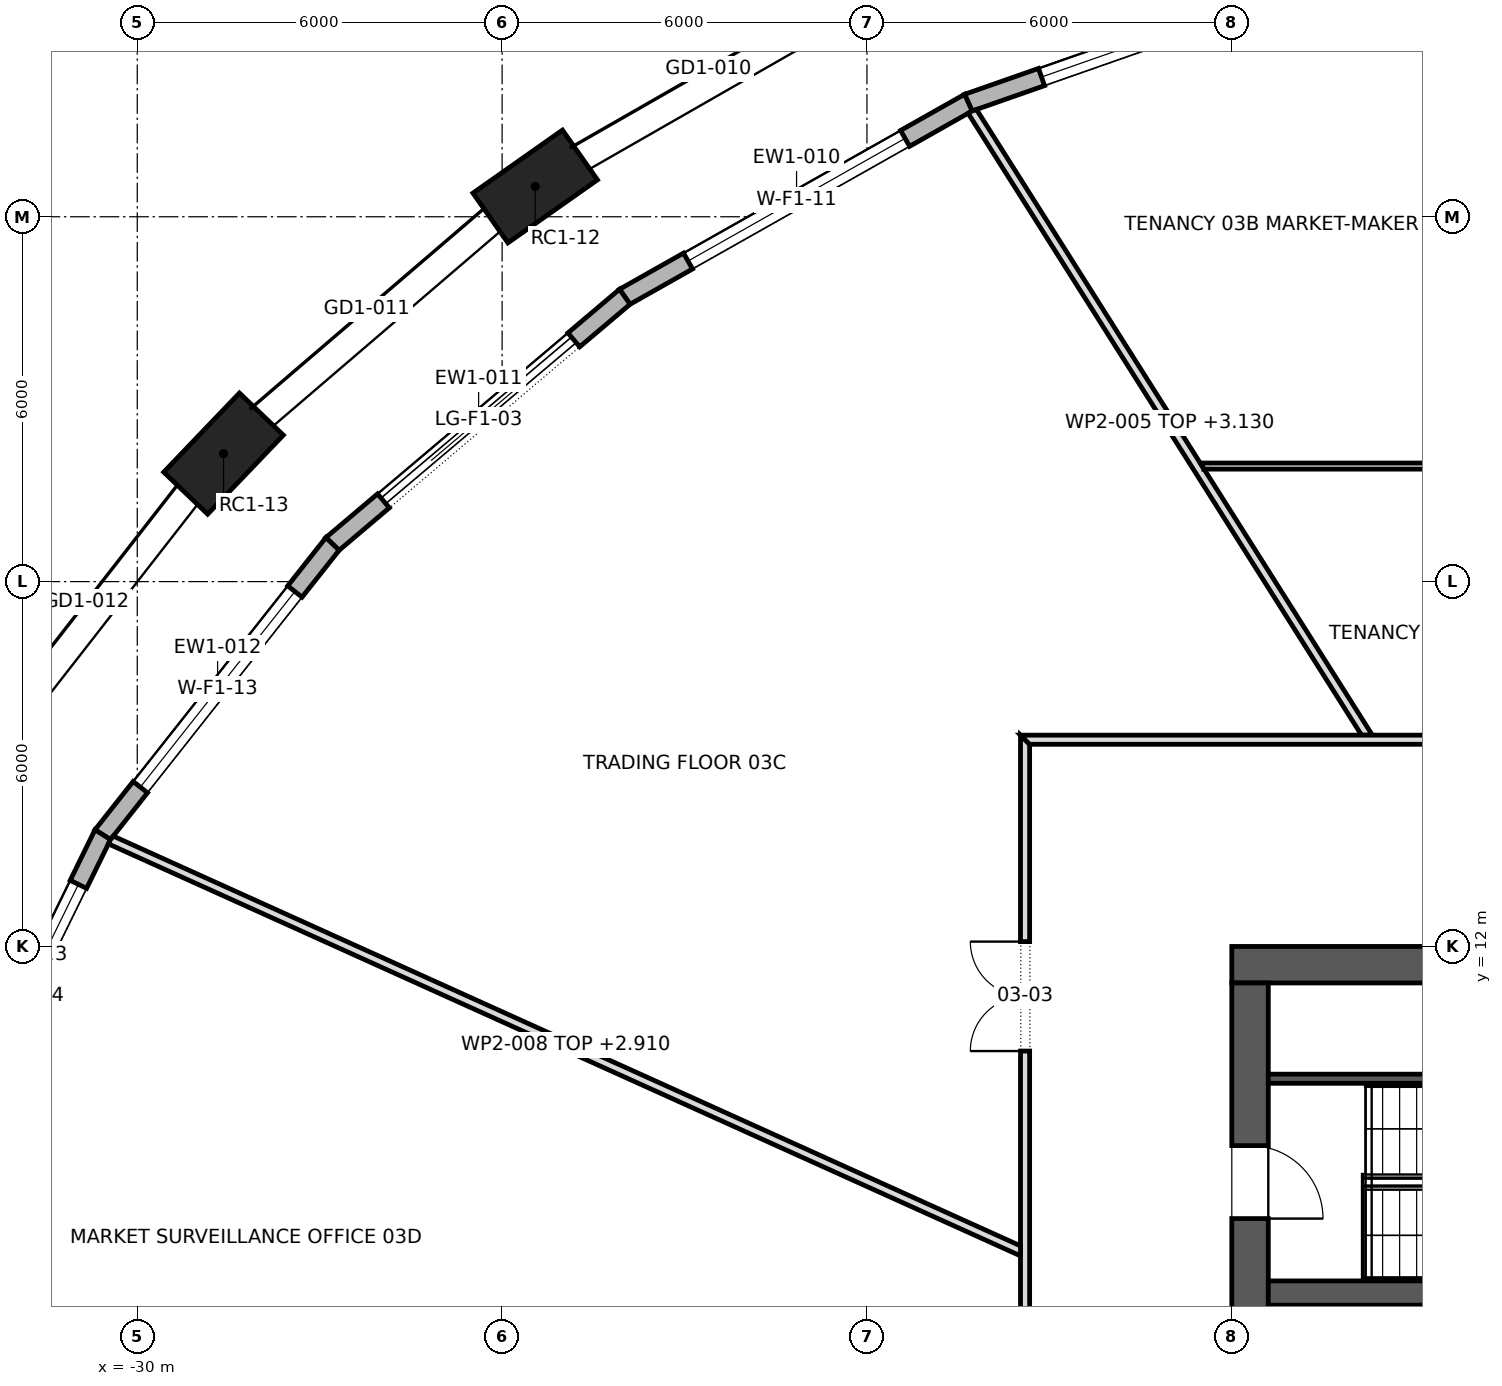
"""IFC4 building model, lengths in metres.
Left out: names, types, materials, properties, quantities, classifications, styles, units other than length and angle.
Written with IfcOpenShell. Run it as: python <this file> out.ifc"""

import sys

from ifc_helpers import new_model, si_unit, direction, frame, frame_2d, origin, origin_2d, place, context, subcontext, project, spatial, polyline, rectangle, outline, extrude, element, fill, save


model = new_model("IFC4")
c1 = context("Model", 3, precision=1e-05, world=origin(), true_north=direction((0.0, 1.0)))
c2 = subcontext(c1, "Body", "Model", "MODEL_VIEW")
j1 = project(units=[si_unit("LENGTHUNIT", "METRE"), si_unit("PLANEANGLEUNIT", "RADIAN")], contexts=[c1])
p1 = place(None, origin())
s1 = spatial("IfcSite", under=j1, at=p1, CompositionType="ELEMENT")
p2 = place(p1, origin())
s2 = spatial("IfcBuilding", under=s1, at=p2, CompositionType="ELEMENT")
p3 = place(p2, frame((0.0, 0.0, 57.1)))
s3 = spatial("IfcBuildingStorey", under=s2, at=p3, CompositionType="ELEMENT", Elevation=57.1)
for number, where, z_axis, x_axis in (
    (1, (-23.456, 24.498, 0.0), (0.0, 0.0, 1.0), (-0.818, -0.575, 0.0)),
    (2, (-28.581, 20.105, 0.0), (0.0, 0.0, 1.0), (-0.692, -0.722, 0.0)),
):
    element("IfcColumn", number, at=place(p3, frame(where, z_axis=z_axis, x_axis=x_axis)), inside=s3, PredefinedType="COLUMN", context=c2, shape_type="SweptSolid", body=[
        extrude(rectangle(XDim=1.8, YDim=1.0, at=origin_2d()), origin(), (0.0, 0.0, 1.0), 4.2),
    ])
p4 = place(p3, frame((-12.0, 11.7, 0.0), z_axis=(0.0, 0.0, 1.0), x_axis=(1.0, 0.0, 0.0)))
e3 = element("IfcWall", 3, at=p4, inside=s3, PredefinedType="SHEAR", context=c2, shape_type="SweptSolid", body=[
    extrude(rectangle(XDim=24.0, YDim=0.6, at=frame_2d((12.0, 0.0))), origin(), (0.0, 0.0, 1.0), 4.2),
])
p5 = place(p4, frame((9.975, 0.0, 0.0)))
e4 = element("IfcOpeningElement", 4, at=p5, cuts=e3, PredefinedType="OPENING", context=c2, shape_type="SweptSolid", body=[
    extrude(rectangle(XDim=0.9, YDim=2.1, at=frame_2d((0.45, 1.05))), frame((0.0, 0.312, 0.0), z_axis=(0.0, -1.0, 0.0), x_axis=(1.0, 0.0, 0.0)), (0.0, 0.0, 1.0), 0.624),
])
p6 = place(p4, frame((3.6, 0.0, 0.0)))
e5 = element("IfcOpeningElement", 5, at=p6, cuts=e3, PredefinedType="OPENING", context=c2, shape_type="SweptSolid", body=[
    extrude(rectangle(XDim=0.8, YDim=2.1, at=frame_2d((0.4, 1.05))), frame((0.0, 0.312, 0.0), z_axis=(0.0, -1.0, 0.0), x_axis=(1.0, 0.0, 0.0)), (0.0, 0.0, 1.0), 0.624),
])
p7 = place(p4, frame((6.2, 0.0, 0.0)))
e6 = element("IfcOpeningElement", 6, at=p7, cuts=e3, PredefinedType="OPENING", context=c2, shape_type="SweptSolid", body=[
    extrude(rectangle(XDim=0.8, YDim=2.1, at=frame_2d((0.4, 1.05))), frame((0.0, 0.312, 0.0), z_axis=(0.0, -1.0, 0.0), x_axis=(1.0, 0.0, 0.0)), (0.0, 0.0, 1.0), 0.624),
])
p8 = place(p4, frame((15.85, 0.0, 0.0)))
e7 = element("IfcOpeningElement", 7, at=p8, cuts=e3, PredefinedType="OPENING", context=c2, shape_type="SweptSolid", body=[
    extrude(rectangle(XDim=0.8, YDim=2.1, at=frame_2d((0.4, 1.05))), frame((0.0, 0.312, 0.0), z_axis=(0.0, -1.0, 0.0), x_axis=(1.0, 0.0, 0.0)), (0.0, 0.0, 1.0), 0.624),
])
p9 = place(p3, frame((-11.7, -11.4, 0.0), z_axis=(0.0, 0.0, 1.0), x_axis=(0.0, 1.0, 0.0)))
e8 = element("IfcWall", 8, at=p9, inside=s3, PredefinedType="SHEAR", context=c2, shape_type="SweptSolid", body=[
    extrude(rectangle(XDim=22.8, YDim=0.6, at=frame_2d((11.4, 0.0))), origin(), (0.0, 0.0, 1.0), 4.2),
])
p10 = place(p9, frame((10.2, 0.0, 0.0)))
e9 = element("IfcOpeningElement", 9, at=p10, cuts=e8, PredefinedType="OPENING", context=c2, shape_type="SweptSolid", body=[
    extrude(rectangle(XDim=2.4, YDim=2.1, at=frame_2d((1.2, 1.05))), frame((0.0, 0.312, 0.0), z_axis=(0.0, -1.0, 0.0), x_axis=(1.0, 0.0, 0.0)), (0.0, 0.0, 1.0), 0.624),
])
p11 = place(p9, frame((18.925, 0.0, 0.0)))
e10 = element("IfcOpeningElement", 10, at=p11, cuts=e8, PredefinedType="OPENING", context=c2, shape_type="SweptSolid", body=[
    extrude(rectangle(XDim=1.2, YDim=2.1, at=frame_2d((0.6, 1.05))), frame((0.0, 0.312, 0.0), z_axis=(0.0, -1.0, 0.0), x_axis=(1.0, 0.0, 0.0)), (0.0, 0.0, 1.0), 0.624),
])
p12 = place(p9, frame((2.675, 0.0, 0.0)))
e11 = element("IfcOpeningElement", 11, at=p12, cuts=e8, PredefinedType="OPENING", context=c2, shape_type="SweptSolid", body=[
    extrude(rectangle(XDim=1.2, YDim=2.1, at=frame_2d((0.6, 1.05))), frame((0.0, 0.312, 0.0), z_axis=(0.0, -1.0, 0.0), x_axis=(1.0, 0.0, 0.0)), (0.0, 0.0, 1.0), 0.624),
])
p13 = place(p3, frame((-11.4, 6.3, 0.0), z_axis=(0.0, 0.0, 1.0), x_axis=(1.0, 0.0, 0.0)))
e12 = element("IfcWall", 12, at=p13, inside=s3, PredefinedType="SHEAR", context=c2, shape_type="SweptSolid", body=[
    extrude(rectangle(XDim=22.8, YDim=0.4, at=frame_2d((11.4, 0.0))), origin(), (0.0, 0.0, 1.0), 4.2),
])
p14 = place(p13, frame((20.85, 0.0, 0.0)))
e13 = element("IfcOpeningElement", 13, at=p14, cuts=e12, PredefinedType="OPENING", context=c2, shape_type="SweptSolid", body=[
    extrude(rectangle(XDim=1.1, YDim=2.1, at=frame_2d((0.55, 1.05))), frame((0.0, 0.212, 0.0), z_axis=(0.0, -1.0, 0.0), x_axis=(1.0, 0.0, 0.0)), (0.0, 0.0, 1.0), 0.424),
])
p15 = place(p3, frame((-8.75, 3.2, 0.0), z_axis=(0.0, 0.0, 1.0), x_axis=(0.0, 1.0, 0.0)))
e14 = element("IfcWall", 14, at=p15, inside=s3, PredefinedType="SHEAR", context=c2, shape_type="SweptSolid", body=[
    extrude(rectangle(XDim=2.9, YDim=0.3, at=frame_2d((1.45, 0.0))), origin(), (0.0, 0.0, 1.0), 4.2),
])
p16 = place(p3, frame((-10.057, 28.074, 0.0), z_axis=(0.0, 0.0, 1.0), x_axis=(-0.943790794479, -0.330543395421, 0.0)))
e15 = element("IfcWall", 15, at=p16, inside=s3, PredefinedType="STANDARD", context=c2, shape_type="SweptSolid", body=[
    extrude(outline(polyline([(-0.013, -0.15), (6.663, -0.15), (6.636, 0.15), (0.013, 0.15), (-0.013, -0.15)])), origin(), (0.0, 0.0, 1.0), 3.9),
])
p17 = place(p16, frame((1.275, 0.0, 0.6)))
e16 = element("IfcOpeningElement", 16, at=p17, cuts=e15, PredefinedType="OPENING", context=c2, shape_type="SweptSolid", body=[
    extrude(rectangle(XDim=4.1, YDim=2.85, at=frame_2d((2.05, 1.425))), frame((0.0, 0.162, 0.0), z_axis=(0.0, -1.0, 0.0), x_axis=(1.0, 0.0, 0.0)), (0.0, 0.0, 1.0), 0.324),
])
p18 = place(p3, frame((-16.333, 25.876, 0.0), z_axis=(0.0, 0.0, 1.0), x_axis=(-0.870647609977, -0.491907246584, 0.0)))
e17 = element("IfcWall", 17, at=p18, inside=s3, PredefinedType="STANDARD", context=c2, shape_type="SweptSolid", body=[
    extrude(outline(polyline([(-0.013, -0.15), (6.503, -0.15), (6.475, 0.15), (0.013, 0.15), (-0.013, -0.15)])), origin(), (0.0, 0.0, 1.0), 3.9),
])
p19 = place(p18, frame((1.195, 0.0, 0.6)))
e18 = element("IfcOpeningElement", 18, at=p19, cuts=e17, PredefinedType="OPENING", context=c2, shape_type="SweptSolid", body=[
    extrude(rectangle(XDim=4.1, YDim=2.85, at=frame_2d((2.05, 1.425))), frame((0.0, 0.162, 0.0), z_axis=(0.0, -1.0, 0.0), x_axis=(1.0, 0.0, 0.0)), (0.0, 0.0, 1.0), 0.324),
])
p20 = place(p3, frame((-21.983, 22.684, 0.0), z_axis=(0.0, 0.0, 1.0), x_axis=(-0.763614259808, -0.645672720671, 0.0)))
e19 = element("IfcWall", 19, at=p20, inside=s3, PredefinedType="STANDARD", context=c2, shape_type="SweptSolid", body=[
    extrude(outline(polyline([(-0.014, -0.15), (6.31, -0.15), (6.28, 0.15), (0.014, 0.15), (-0.014, -0.15)])), origin(), (0.0, 0.0, 1.0), 3.9),
])
p21 = place(p20, frame((1.097, 0.0, 0.0)))
e20 = element("IfcOpeningElement", 20, at=p21, cuts=e19, PredefinedType="OPENING", context=c2, shape_type="SweptSolid", body=[
    extrude(rectangle(XDim=4.1, YDim=3.45, at=frame_2d((2.05, 1.725))), frame((0.0, 0.162, 0.0), z_axis=(0.0, -1.0, 0.0), x_axis=(1.0, 0.0, 0.0)), (0.0, 0.0, 1.0), 0.324),
])
p22 = place(p3, frame((-26.79, 18.62, 0.0), z_axis=(0.0, 0.0, 1.0), x_axis=(-0.619993638342, -0.78460683684, 0.0)))
e21 = element("IfcWall", 21, at=p22, inside=s3, PredefinedType="STANDARD", context=c2, shape_type="SweptSolid", body=[
    extrude(outline(polyline([(-0.015, -0.15), (6.11, -0.15), (6.078, 0.15), (0.015, 0.15), (-0.015, -0.15)])), origin(), (0.0, 0.0, 1.0), 3.9),
])
p23 = place(p22, frame((0.997, 0.0, 0.6)))
e22 = element("IfcOpeningElement", 22, at=p23, cuts=e21, PredefinedType="OPENING", context=c2, shape_type="SweptSolid", body=[
    extrude(rectangle(XDim=4.1, YDim=2.85, at=frame_2d((2.05, 1.425))), frame((0.0, 0.162, 0.0), z_axis=(0.0, -1.0, 0.0), x_axis=(1.0, 0.0, 0.0)), (0.0, 0.0, 1.0), 0.324),
])
p24 = place(p3, frame((-30.568, 13.838, 0.0), z_axis=(0.0, 0.0, 1.0), x_axis=(-0.439906146647, -0.898043752911, 0.0)))
e23 = element("IfcWall", 23, at=p24, inside=s3, PredefinedType="STANDARD", context=c2, shape_type="SweptSolid", body=[
    extrude(outline(polyline([(-0.016, -0.15), (5.936, -0.15), (5.902, 0.15), (0.016, 0.15), (-0.016, -0.15)])), origin(), (0.0, 0.0, 1.0), 3.9),
])
p25 = place(p24, frame((0.909, 0.0, 0.6)))
e24 = element("IfcOpeningElement", 24, at=p25, cuts=e23, PredefinedType="OPENING", context=c2, shape_type="SweptSolid", body=[
    extrude(rectangle(XDim=4.1, YDim=2.85, at=frame_2d((2.05, 1.425))), frame((0.0, 0.162, 0.0), z_axis=(0.0, -1.0, 0.0), x_axis=(1.0, 0.0, 0.0)), (0.0, 0.0, 1.0), 0.324),
])
p26 = place(p3, frame((-11.4, 9.825, 0.0), z_axis=(0.0, 0.0, 1.0), x_axis=(1.0, 0.0, 0.0)))
e25 = element("IfcWall", 25, at=p26, inside=s3, PredefinedType="SHEAR", context=c2, shape_type="SweptSolid", body=[
    extrude(rectangle(XDim=8.0, YDim=0.15, at=frame_2d((4.0, 0.0))), origin(), (0.0, 0.0, 1.0), 3.9),
])
p27 = place(p3, frame((-16.273, 25.742, 0.0), z_axis=(0.0, 0.0, 1.0), x_axis=(0.534654841392, -0.845070529942, 0.0)))
e26 = element("IfcWall", 26, at=p27, inside=s3, PredefinedType="PARTITIONING", context=c2, shape_type="SweptSolid", body=[
    extrude(outline(polyline([(0.0, -0.075), (1.729, -0.075), (3.458, -0.075), (5.186, -0.075), (6.915, -0.075), (8.644, -0.075), (10.373, -0.075), (12.102, -0.075), (12.196, 0.075), (12.196, 0.075), (10.471, 0.075), (8.745, 0.075), (7.019, 0.075), (7.018, 0.072), (7.013, 0.075), (5.265, 0.075), (3.517, 0.075), (1.769, 0.075), (0.021, 0.075), (0.004, 0.0), (0.0, -0.071), (0.0, -0.075)])), origin(), (0.0, 0.0, 1.0), 3.13),
])
p28 = place(p3, frame((-15.4, -15.475, 0.0), z_axis=(0.0, 0.0, 1.0), x_axis=(0.0, 1.0, 0.0)))
e27 = element("IfcWall", 27, at=p28, inside=s3, PredefinedType="PARTITIONING", context=c2, shape_type="SweptSolid", body=[
    extrude(outline(polyline([(0.15, -0.075), (2.066, -0.075), (3.981, -0.075), (5.897, -0.075), (7.812, -0.075), (9.728, -0.075), (11.644, -0.075), (13.56, -0.075), (15.475, -0.075), (17.391, -0.075), (19.306, -0.075), (21.222, -0.075), (23.138, -0.075), (25.053, -0.075), (26.969, -0.075), (28.885, -0.075), (30.8, -0.075), (30.95, 0.075), (29.016, 0.075), (27.081, 0.075), (25.147, 0.075), (23.212, 0.075), (21.278, 0.075), (19.344, 0.075), (17.409, 0.075), (15.475, 0.075), (13.541, 0.075), (11.606, 0.075), (9.672, 0.075), (7.738, 0.075), (5.803, 0.075), (3.869, 0.075), (1.935, 0.075), (0.0, 0.075), (0.15, -0.075)])), origin(), (0.0, 0.0, 1.0), 3.9),
])
p29 = place(p28, frame((25.755, 0.0, 0.0)))
e28 = element("IfcOpeningElement", 28, at=p29, cuts=e27, PredefinedType="OPENING", context=c2, shape_type="SweptSolid", body=[
    extrude(rectangle(XDim=1.8, YDim=2.1, at=frame_2d((0.9, 1.05))), frame((0.0, 0.087, 0.0), z_axis=(0.0, -1.0, 0.0), x_axis=(1.0, 0.0, 0.0)), (0.0, 0.0, 1.0), 0.174),
])
p30 = place(p28, frame((18.695, 0.0, 0.0)))
e29 = element("IfcOpeningElement", 29, at=p30, cuts=e27, PredefinedType="OPENING", context=c2, shape_type="SweptSolid", body=[
    extrude(rectangle(XDim=1.8, YDim=2.1, at=frame_2d((0.9, 1.05))), frame((0.0, 0.087, 0.0), z_axis=(0.0, -1.0, 0.0), x_axis=(1.0, 0.0, 0.0)), (0.0, 0.0, 1.0), 0.174),
])
p31 = place(p28, frame((12.135, 0.0, 0.0)))
e30 = element("IfcOpeningElement", 30, at=p31, cuts=e27, PredefinedType="OPENING", context=c2, shape_type="SweptSolid", body=[
    extrude(rectangle(XDim=1.0, YDim=2.1, at=frame_2d((0.5, 1.05))), frame((0.0, 0.087, 0.0), z_axis=(0.0, -1.0, 0.0), x_axis=(1.0, 0.0, 0.0)), (0.0, 0.0, 1.0), 0.174),
])
p32 = place(p28, frame((3.395, 0.0, 0.0)))
e31 = element("IfcOpeningElement", 31, at=p32, cuts=e27, PredefinedType="OPENING", context=c2, shape_type="SweptSolid", body=[
    extrude(rectangle(XDim=1.8, YDim=2.1, at=frame_2d((0.9, 1.05))), frame((0.0, 0.087, 0.0), z_axis=(0.0, -1.0, 0.0), x_axis=(1.0, 0.0, 0.0)), (0.0, 0.0, 1.0), 0.174),
])
p33 = place(p3, frame((-15.444, 6.98, 0.0), z_axis=(0.0, 0.0, 1.0), x_axis=(-0.911343853748, 0.411645940385, 0.0)))
e32 = element("IfcWall", 32, at=p33, inside=s3, PredefinedType="PARTITIONING", context=c2, shape_type="SweptSolid", body=[
    extrude(outline(polyline([(0.068, -0.075), (1.887, -0.075), (3.706, -0.075), (5.525, -0.075), (7.344, -0.075), (9.163, -0.075), (10.982, -0.075), (12.801, -0.075), (14.62, -0.075), (16.439, -0.075), (16.457, -0.004), (16.459, 0.064), (16.459, 0.075), (14.63, 0.075), (12.801, 0.075), (10.972, 0.075), (9.144, 0.075), (7.315, 0.075), (5.486, 0.075), (3.657, 0.075), (1.829, 0.075), (0.0, 0.075), (0.068, -0.075)])), origin(), (0.0, 0.0, 1.0), 2.91),
])
p34 = place(p3, frame((-15.475, 15.4, 0.0), z_axis=(0.0, 0.0, 1.0), x_axis=(1.0, 0.0, 0.0)))
e33 = element("IfcWall", 33, at=p34, inside=s3, PredefinedType="PARTITIONING", context=c2, shape_type="SweptSolid", body=[
    extrude(outline(polyline([(0.15, -0.075), (2.066, -0.075), (3.981, -0.075), (5.897, -0.075), (7.812, -0.075), (9.728, -0.075), (11.644, -0.075), (13.56, -0.075), (15.475, -0.075), (17.391, -0.075), (19.306, -0.075), (21.222, -0.075), (23.138, -0.075), (25.053, -0.075), (26.969, -0.075), (28.885, -0.075), (30.8, -0.075), (30.95, 0.075), (29.016, 0.075), (27.081, 0.075), (25.147, 0.075), (23.212, 0.075), (21.278, 0.075), (19.344, 0.075), (17.409, 0.075), (15.475, 0.075), (13.541, 0.075), (11.606, 0.075), (9.672, 0.075), (7.738, 0.075), (5.803, 0.075), (3.869, 0.075), (1.935, 0.075), (0.0, 0.075), (0.15, -0.075)])), origin(), (0.0, 0.0, 1.0), 3.9),
])
p35 = place(p34, frame((16.84, 0.0, 0.0)))
e34 = element("IfcOpeningElement", 34, at=p35, cuts=e33, PredefinedType="OPENING", context=c2, shape_type="SweptSolid", body=[
    extrude(rectangle(XDim=1.0, YDim=2.1, at=frame_2d((0.5, 1.05))), frame((0.0, 0.087, 0.0), z_axis=(0.0, -1.0, 0.0), x_axis=(1.0, 0.0, 0.0)), (0.0, 0.0, 1.0), 0.174),
])
p36 = place(p34, frame((9.215, 0.0, 0.0)))
e35 = element("IfcOpeningElement", 35, at=p36, cuts=e33, PredefinedType="OPENING", context=c2, shape_type="SweptSolid", body=[
    extrude(rectangle(XDim=1.0, YDim=2.1, at=frame_2d((0.5, 1.05))), frame((0.0, 0.087, 0.0), z_axis=(0.0, -1.0, 0.0), x_axis=(1.0, 0.0, 0.0)), (0.0, 0.0, 1.0), 0.174),
])
p37 = place(p34, frame((25.21, 0.0, 0.0)))
e36 = element("IfcOpeningElement", 36, at=p37, cuts=e33, PredefinedType="OPENING", context=c2, shape_type="SweptSolid", body=[
    extrude(rectangle(XDim=1.0, YDim=2.1, at=frame_2d((0.5, 1.05))), frame((0.0, 0.087, 0.0), z_axis=(0.0, -1.0, 0.0), x_axis=(1.0, 0.0, 0.0)), (0.0, 0.0, 1.0), 0.174),
])
p38 = place(p3, frame((-12.52, 19.9, 0.0), z_axis=(0.0, 0.0, 1.0), x_axis=(1.0, 0.0, 0.0)))
e37 = element("IfcWall", 37, at=p38, inside=s3, PredefinedType="PARTITIONING", context=c2, shape_type="SweptSolid", body=[
    extrude(outline(polyline([(10.134, -0.05), (10.134, -0.049), (10.122, 0.05), (8.435, 0.05), (6.748, 0.05), (5.061, 0.05), (3.374, 0.05), (1.687, 0.05), (0.0, 0.05), (0.0, 0.05), (0.063, -0.05), (1.741, -0.05), (3.42, -0.05), (5.098, -0.05), (6.777, -0.05), (8.455, -0.05), (10.134, -0.05)])), origin(), (0.0, 0.0, 1.0), 3.9),
])
p39 = place(p38, frame((4.619, 0.0, 0.0)))
e38 = element("IfcOpeningElement", 38, at=p39, cuts=e37, PredefinedType="OPENING", context=c2, shape_type="SweptSolid", body=[
    extrude(rectangle(XDim=0.9, YDim=2.1, at=frame_2d((0.45, 1.05))), frame((0.0, 0.062, 0.0), z_axis=(0.0, -1.0, 0.0), x_axis=(1.0, 0.0, 0.0)), (0.0, 0.0, 1.0), 0.124),
])
p40 = place(p17, origin())
e39 = element("IfcWindow", 39, at=p40, inside=s3, PartitioningType="TRIPLE_PANEL_VERTICAL", PredefinedType="WINDOW", context=c2, shape_type="SweptSolid", body=[
    extrude(rectangle(XDim=4.1, YDim=2.85, at=frame_2d((2.05, 1.425))), frame((0.0, 0.03, 0.0), z_axis=(0.0, -1.0, 0.0), x_axis=(1.0, 0.0, 0.0)), (0.0, 0.0, 1.0), 0.06),
])
fill(e16, e39)
p41 = place(p19, origin())
e40 = element("IfcWindow", 40, at=p41, inside=s3, PartitioningType="TRIPLE_PANEL_VERTICAL", PredefinedType="WINDOW", context=c2, shape_type="SweptSolid", body=[
    extrude(rectangle(XDim=4.1, YDim=2.85, at=frame_2d((2.05, 1.425))), frame((0.0, 0.03, 0.0), z_axis=(0.0, -1.0, 0.0), x_axis=(1.0, 0.0, 0.0)), (0.0, 0.0, 1.0), 0.06),
])
fill(e18, e40)
p42 = place(p21, origin())
e41 = element("IfcDoor", 41, at=p42, inside=s3, OperationType="DOUBLE_DOOR_SLIDING", PredefinedType="DOOR", context=c2, shape_type="SweptSolid", body=[
    extrude(rectangle(XDim=4.1, YDim=3.45, at=frame_2d((2.05, 1.725))), frame((0.0, 0.025, 0.0), z_axis=(0.0, -1.0, 0.0), x_axis=(1.0, 0.0, 0.0)), (0.0, 0.0, 1.0), 0.05),
])
fill(e20, e41)
p43 = place(p23, origin())
e42 = element("IfcWindow", 42, at=p43, inside=s3, PartitioningType="TRIPLE_PANEL_VERTICAL", PredefinedType="WINDOW", context=c2, shape_type="SweptSolid", body=[
    extrude(rectangle(XDim=4.1, YDim=2.85, at=frame_2d((2.05, 1.425))), frame((0.0, 0.03, 0.0), z_axis=(0.0, -1.0, 0.0), x_axis=(1.0, 0.0, 0.0)), (0.0, 0.0, 1.0), 0.06),
])
fill(e22, e42)
p44 = place(p25, origin())
e43 = element("IfcWindow", 43, at=p44, inside=s3, PartitioningType="TRIPLE_PANEL_VERTICAL", PredefinedType="WINDOW", context=c2, shape_type="SweptSolid", body=[
    extrude(rectangle(XDim=4.1, YDim=2.85, at=frame_2d((2.05, 1.425))), frame((0.0, 0.03, 0.0), z_axis=(0.0, -1.0, 0.0), x_axis=(1.0, 0.0, 0.0)), (0.0, 0.0, 1.0), 0.06),
])
fill(e24, e43)
p45 = place(p11, frame((1.2, 0.0, 0.0), z_axis=(0.0, 0.0, 1.0), x_axis=(-1.0, 0.0, 0.0)))
e44 = element("IfcDoor", 44, at=p45, inside=s3, OperationType="SINGLE_SWING_LEFT", PredefinedType="DOOR", context=c2, shape_type="SweptSolid", body=[
    extrude(rectangle(XDim=1.2, YDim=2.1, at=frame_2d((0.6, 1.05))), frame((0.0, 0.025, 0.0), z_axis=(0.0, -1.0, 0.0), x_axis=(1.0, 0.0, 0.0)), (0.0, 0.0, 1.0), 0.05),
])
fill(e10, e44)
p46 = place(p29, origin())
e45 = element("IfcDoor", 45, at=p46, inside=s3, OperationType="DOUBLE_DOOR_SINGLE_SWING", PredefinedType="DOOR", context=c2, shape_type="SweptSolid", body=[
    extrude(rectangle(XDim=1.8, YDim=2.1, at=frame_2d((0.9, 1.05))), frame((0.0, 0.025, 0.0), z_axis=(0.0, -1.0, 0.0), x_axis=(1.0, 0.0, 0.0)), (0.0, 0.0, 1.0), 0.05),
])
fill(e28, e45)
save(model, sys.argv[1])
